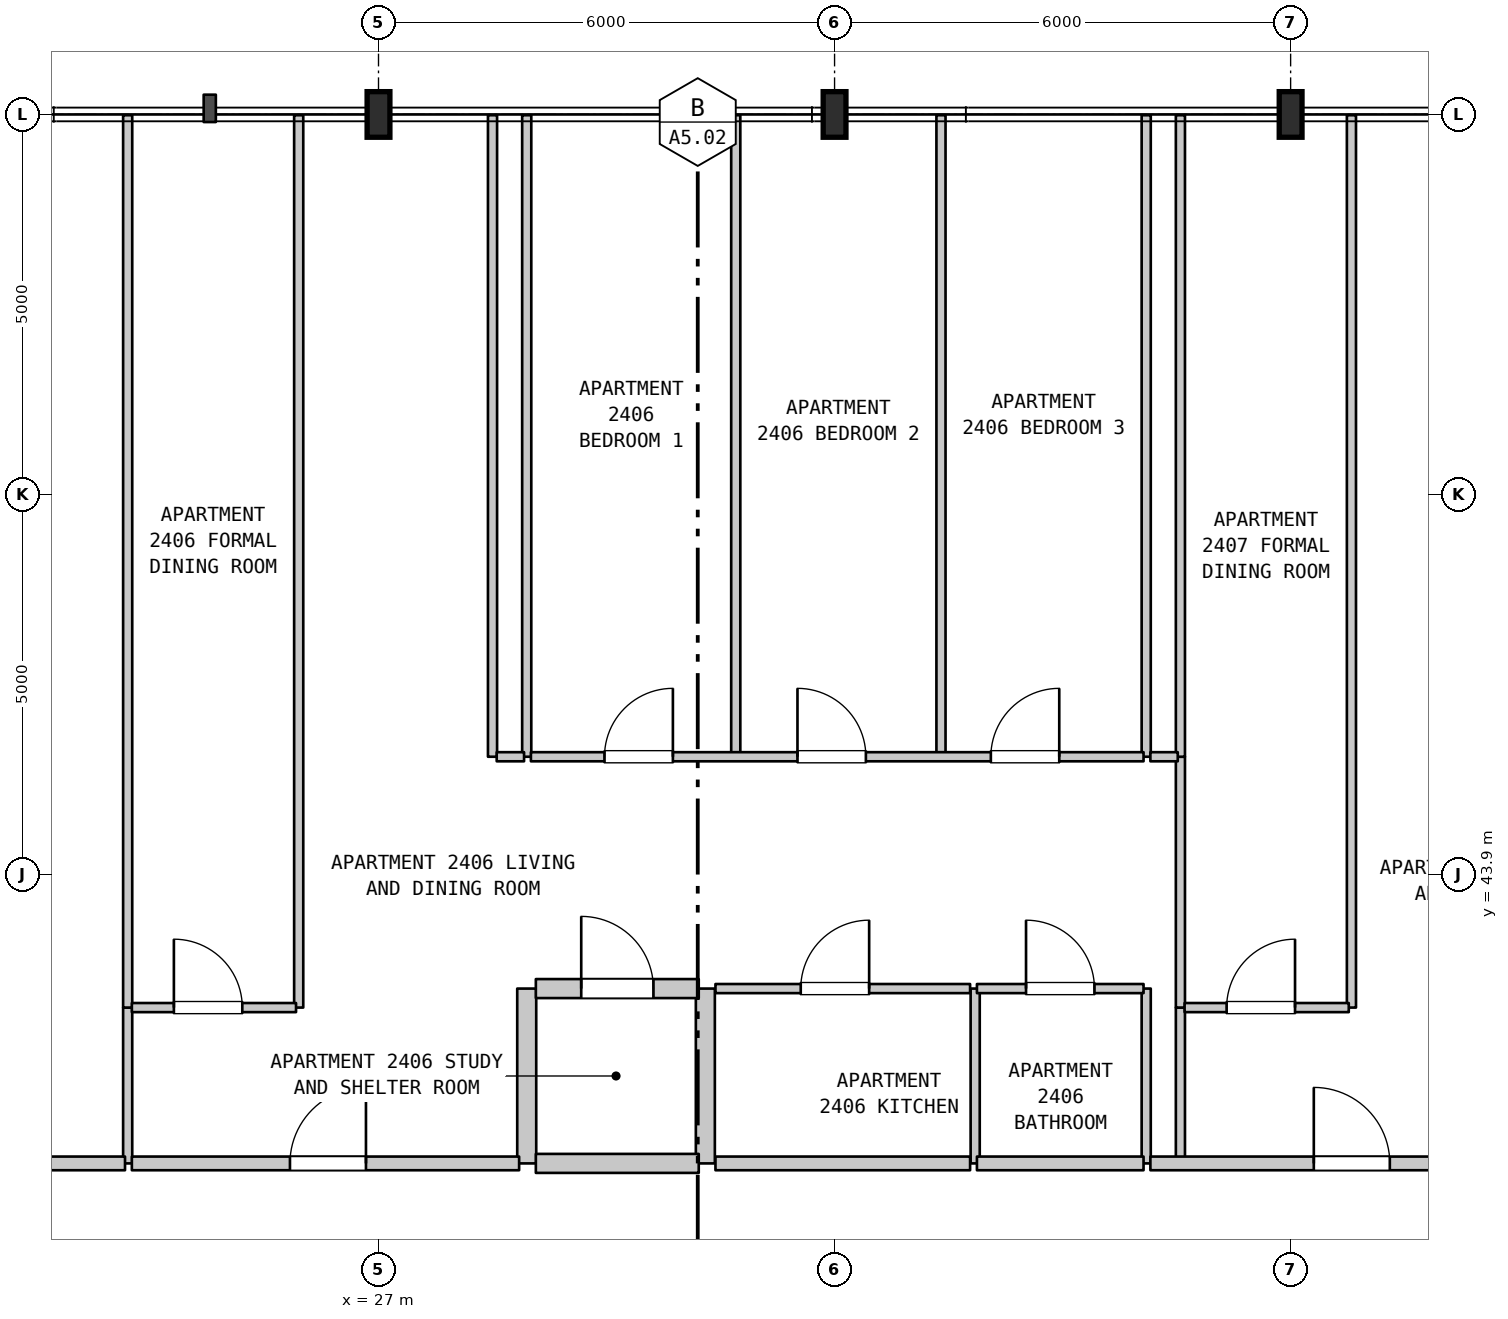
"""IFC4 building model, lengths in metres.
Left out: names, types, materials, properties, quantities, classifications, styles, units other than length and angle.
Written with IfcOpenShell. Run it as: python <this file> out.ifc"""

import sys

from ifc_helpers import new_model, si_unit, direction, frame, frame_2d, origin, origin_2d, place, context, subcontext, project, spatial, rectangle, i_section, extrude, element, fill, save


model = new_model("IFC4")
c1 = context("Model", 3, precision=1e-05, world=origin(), true_north=direction((0.0, 1.0)))
c2 = subcontext(c1, "Body", "Model", "MODEL_VIEW")
j1 = project(units=[si_unit("LENGTHUNIT", "METRE"), si_unit("PLANEANGLEUNIT", "RADIAN")], contexts=[c1])
p1 = place(None, origin())
s1 = spatial("IfcSite", under=j1, at=p1, CompositionType="ELEMENT")
p2 = place(p1, origin())
s2 = spatial("IfcBuilding", under=s1, at=p2, CompositionType="ELEMENT")
p3 = place(p2, frame((0.0, 0.0, 102.0)))
s3 = spatial("IfcBuildingStorey", under=s2, at=p3, CompositionType="ELEMENT", Elevation=102.0)
for number, where, z_axis, x_axis in (
    (1, (27.0, 53.9, 0.0), (0.0, 0.0, 1.0), (1.0, 0.0, 0.0)),
    (2, (33.0, 53.9, 0.0), (0.0, 0.0, 1.0), (1.0, 0.0, 0.0)),
    (3, (39.0, 53.9, 0.0), (0.0, 0.0, 1.0), (1.0, 0.0, 0.0)),
):
    element("IfcColumn", number, at=place(p3, frame(where, z_axis=z_axis, x_axis=x_axis)), inside=s3, PredefinedType="COLUMN", context=c2, shape_type="SweptSolid", body=[
        extrude(i_section(OverallWidth=0.3, OverallDepth=0.6, WebThickness=0.015, FlangeThickness=0.03, FilletRadius=0.027, at=origin_2d()), origin(), (0.0, 0.0, 1.0), 3.7),
    ])
p4 = place(p3, frame((23.7, 40.1, 0.0), z_axis=(0.0, 0.0, 1.0), x_axis=(0.0, 1.0, 0.0)))
e4 = element("IfcWall", 4, at=p4, inside=s3, PredefinedType="PARTITIONING", context=c2, shape_type="SweptSolid", body=[
    extrude(rectangle(XDim=2.05, YDim=0.12, at=frame_2d((1.025, 0.0))), origin(), (0.0, 0.0, 1.0), 3.385),
])
for number, where, z_axis, x_axis in (
    (5, (23.7, 42.15, 0.0), (0.0, 0.0, 1.0), (0.0, 1.0, 0.0)),
    (6, (25.95, 42.15, 0.0), (0.0, 0.0, 1.0), (0.0, 1.0, 0.0)),
):
    element("IfcWall", number, at=place(p3, frame(where, z_axis=z_axis, x_axis=x_axis)), inside=s3, PredefinedType="PARTITIONING", context=c2, shape_type="SweptSolid", body=[
        extrude(rectangle(XDim=11.74, YDim=0.12, at=frame_2d((5.87, 0.0))), origin(), (0.0, 0.0, 1.0), 3.385),
    ])
p5 = place(p3, frame((28.5, 45.45, 0.0), z_axis=(0.0, 0.0, 1.0), x_axis=(0.0, 1.0, 0.0)))
e7 = element("IfcWall", 7, at=p5, inside=s3, PredefinedType="PARTITIONING", context=c2, shape_type="SweptSolid", body=[
    extrude(rectangle(XDim=8.44, YDim=0.12, at=frame_2d((4.22, 0.0))), origin(), (0.0, 0.0, 1.0), 3.385),
])
p6 = place(p3, frame((28.95, 40.1, 0.0), z_axis=(0.0, 0.0, 1.0), x_axis=(0.0, 1.0, 0.0)))
e8 = element("IfcWall", 8, at=p6, inside=s3, PredefinedType="STANDARD", context=c2, shape_type="SweptSolid", body=[
    extrude(rectangle(XDim=2.3, YDim=0.25, at=frame_2d((1.15, 0.0))), origin(), (0.0, 0.0, 1.0), 3.385),
])
p7 = place(p3, frame((28.95, 45.45, 0.0), z_axis=(0.0, 0.0, 1.0), x_axis=(0.0, 1.0, 0.0)))
e9 = element("IfcWall", 9, at=p7, inside=s3, PredefinedType="PARTITIONING", context=c2, shape_type="SweptSolid", body=[
    extrude(rectangle(XDim=8.44, YDim=0.12, at=frame_2d((4.22, 0.0))), origin(), (0.0, 0.0, 1.0), 3.385),
])
p8 = place(p3, frame((31.3, 40.1, 0.0), z_axis=(0.0, 0.0, 1.0), x_axis=(0.0, 1.0, 0.0)))
e10 = element("IfcWall", 10, at=p8, inside=s3, PredefinedType="STANDARD", context=c2, shape_type="SweptSolid", body=[
    extrude(rectangle(XDim=2.3, YDim=0.25, at=frame_2d((1.15, 0.0))), origin(), (0.0, 0.0, 1.0), 3.385),
])
for number, where, z_axis, x_axis in (
    (11, (31.7, 45.45, 0.0), (0.0, 0.0, 1.0), (0.0, 1.0, 0.0)),
    (12, (34.4, 45.45, 0.0), (0.0, 0.0, 1.0), (0.0, 1.0, 0.0)),
):
    element("IfcWall", number, at=place(p3, frame(where, z_axis=z_axis, x_axis=x_axis)), inside=s3, PredefinedType="PARTITIONING", context=c2, shape_type="SweptSolid", body=[
        extrude(rectangle(XDim=8.44, YDim=0.12, at=frame_2d((4.22, 0.0))), origin(), (0.0, 0.0, 1.0), 3.385),
    ])
for number, where, z_axis, x_axis in (
    (13, (34.85, 40.1, 0.0), (0.0, 0.0, 1.0), (0.0, 1.0, 0.0)),
    (14, (37.1, 40.1, 0.0), (0.0, 0.0, 1.0), (0.0, 1.0, 0.0)),
):
    element("IfcWall", number, at=place(p3, frame(where, z_axis=z_axis, x_axis=x_axis)), inside=s3, PredefinedType="PARTITIONING", context=c2, shape_type="SweptSolid", body=[
        extrude(rectangle(XDim=2.3, YDim=0.12, at=frame_2d((1.15, 0.0))), origin(), (0.0, 0.0, 1.0), 3.385),
    ])
p9 = place(p3, frame((37.1, 45.45, 0.0), z_axis=(0.0, 0.0, 1.0), x_axis=(0.0, 1.0, 0.0)))
e15 = element("IfcWall", 15, at=p9, inside=s3, PredefinedType="PARTITIONING", context=c2, shape_type="SweptSolid", body=[
    extrude(rectangle(XDim=8.44, YDim=0.12, at=frame_2d((4.22, 0.0))), origin(), (0.0, 0.0, 1.0), 3.385),
])
p10 = place(p3, frame((37.55, 40.1, 0.0), z_axis=(0.0, 0.0, 1.0), x_axis=(0.0, 1.0, 0.0)))
e16 = element("IfcWall", 16, at=p10, inside=s3, PredefinedType="PARTITIONING", context=c2, shape_type="SweptSolid", body=[
    extrude(rectangle(XDim=2.05, YDim=0.12, at=frame_2d((1.025, 0.0))), origin(), (0.0, 0.0, 1.0), 3.385),
])
p11 = place(p3, frame((37.55, 42.15, 0.0), z_axis=(0.0, 0.0, 1.0), x_axis=(0.0, 1.0, 0.0)))
e17 = element("IfcWall", 17, at=p11, inside=s3, PredefinedType="PARTITIONING", context=c2, shape_type="SweptSolid", body=[
    extrude(rectangle(XDim=3.3, YDim=0.12, at=frame_2d((1.65, 0.0))), origin(), (0.0, 0.0, 1.0), 3.385),
])
p12 = place(p3, frame((37.55, 45.45, 0.0), z_axis=(0.0, 0.0, 1.0), x_axis=(0.0, 1.0, 0.0)))
e18 = element("IfcWall", 18, at=p12, inside=s3, PredefinedType="PARTITIONING", context=c2, shape_type="SweptSolid", body=[
    extrude(rectangle(XDim=8.44, YDim=0.12, at=frame_2d((4.22, 0.0))), origin(), (0.0, 0.0, 1.0), 3.385),
])
p13 = place(p3, frame((39.8, 42.15, 0.0), z_axis=(0.0, 0.0, 1.0), x_axis=(0.0, 1.0, 0.0)))
e19 = element("IfcWall", 19, at=p13, inside=s3, PredefinedType="PARTITIONING", context=c2, shape_type="SweptSolid", body=[
    extrude(rectangle(XDim=11.74, YDim=0.12, at=frame_2d((5.87, 0.0))), origin(), (0.0, 0.0, 1.0), 3.385),
])
p14 = place(p3, frame((21.255, 40.1, 0.0), z_axis=(0.0, 0.0, 1.0), x_axis=(1.0, 0.0, 0.0)))
e20 = element("IfcWall", 20, at=p14, inside=s3, PredefinedType="STANDARD", context=c2, shape_type="SweptSolid", body=[
    extrude(rectangle(XDim=2.41, YDim=0.18, at=frame_2d((1.205, 0.0))), origin(), (0.0, 0.0, 1.0), 3.385),
])
p15 = place(p3, frame((23.755, 40.1, 0.0), z_axis=(0.0, 0.0, 1.0), x_axis=(1.0, 0.0, 0.0)))
e21 = element("IfcWall", 21, at=p15, inside=s3, PredefinedType="STANDARD", context=c2, shape_type="SweptSolid", body=[
    extrude(rectangle(XDim=5.095, YDim=0.18, at=frame_2d((2.548, 0.0))), origin(), (0.0, 0.0, 1.0), 3.385),
])
p16 = place(p15, frame((2.08, 0.0, 0.0)))
e22 = element("IfcOpeningElement", 22, at=p16, cuts=e21, PredefinedType="OPENING", context=c2, shape_type="SweptSolid", body=[
    extrude(rectangle(XDim=1.0, YDim=2.15, at=frame_2d((0.5, 1.075))), frame((0.0, 0.1, 0.0), z_axis=(0.0, -1.0, 0.0), x_axis=(1.0, 0.0, 0.0)), (0.0, 0.0, 1.0), 0.2),
])
p17 = place(p3, frame((29.07, 40.1, 0.0), z_axis=(0.0, 0.0, 1.0), x_axis=(1.0, 0.0, 0.0)))
e23 = element("IfcWall", 23, at=p17, inside=s3, PredefinedType="STANDARD", context=c2, shape_type="SweptSolid", body=[
    extrude(rectangle(XDim=2.143, YDim=0.25, at=frame_2d((1.071, 0.0))), origin(), (0.0, 0.0, 1.0), 3.385),
])
p18 = place(p3, frame((31.433, 40.1, 0.0), z_axis=(0.0, 0.0, 1.0), x_axis=(1.0, 0.0, 0.0)))
e24 = element("IfcWall", 24, at=p18, inside=s3, PredefinedType="STANDARD", context=c2, shape_type="SweptSolid", body=[
    extrude(rectangle(XDim=3.35, YDim=0.18, at=frame_2d((1.675, 0.0))), origin(), (0.0, 0.0, 1.0), 3.385),
])
p19 = place(p3, frame((34.873, 40.1, 0.0), z_axis=(0.0, 0.0, 1.0), x_axis=(1.0, 0.0, 0.0)))
e25 = element("IfcWall", 25, at=p19, inside=s3, PredefinedType="STANDARD", context=c2, shape_type="SweptSolid", body=[
    extrude(rectangle(XDim=2.192, YDim=0.18, at=frame_2d((1.096, 0.0))), origin(), (0.0, 0.0, 1.0), 3.385),
])
p20 = place(p3, frame((37.155, 40.1, 0.0), z_axis=(0.0, 0.0, 1.0), x_axis=(1.0, 0.0, 0.0)))
e26 = element("IfcWall", 26, at=p20, inside=s3, PredefinedType="STANDARD", context=c2, shape_type="SweptSolid", body=[
    extrude(rectangle(XDim=5.3, YDim=0.18, at=frame_2d((2.65, 0.0))), origin(), (0.0, 0.0, 1.0), 3.385),
])
p21 = place(p20, frame((2.15, 0.0, 0.0)))
e27 = element("IfcOpeningElement", 27, at=p21, cuts=e26, PredefinedType="OPENING", context=c2, shape_type="SweptSolid", body=[
    extrude(rectangle(XDim=1.0, YDim=2.15, at=frame_2d((0.5, 1.075))), frame((0.0, 0.1, 0.0), z_axis=(0.0, -1.0, 0.0), x_axis=(1.0, 0.0, 0.0)), (0.0, 0.0, 1.0), 0.2),
])
p22 = place(p3, frame((23.755, 42.15, 0.0), z_axis=(0.0, 0.0, 1.0), x_axis=(1.0, 0.0, 0.0)))
e28 = element("IfcWall", 28, at=p22, inside=s3, PredefinedType="PARTITIONING", context=c2, shape_type="SweptSolid", body=[
    extrude(rectangle(XDim=2.16, YDim=0.12, at=frame_2d((1.08, 0.0))), origin(), (0.0, 0.0, 1.0), 3.385),
])
p23 = place(p22, frame((0.553, 0.0, 0.0)))
e29 = element("IfcOpeningElement", 29, at=p23, cuts=e28, PredefinedType="OPENING", context=c2, shape_type="SweptSolid", body=[
    extrude(rectangle(XDim=0.9, YDim=2.15, at=frame_2d((0.45, 1.075))), frame((0.0, 0.07, 0.0), z_axis=(0.0, -1.0, 0.0), x_axis=(1.0, 0.0, 0.0)), (0.0, 0.0, 1.0), 0.14),
])
p24 = place(p3, frame((37.605, 42.15, 0.0), z_axis=(0.0, 0.0, 1.0), x_axis=(1.0, 0.0, 0.0)))
e30 = element("IfcWall", 30, at=p24, inside=s3, PredefinedType="PARTITIONING", context=c2, shape_type="SweptSolid", body=[
    extrude(rectangle(XDim=2.16, YDim=0.12, at=frame_2d((1.08, 0.0))), origin(), (0.0, 0.0, 1.0), 3.385),
])
p25 = place(p24, frame((0.553, 0.0, 0.0)))
e31 = element("IfcOpeningElement", 31, at=p25, cuts=e30, PredefinedType="OPENING", context=c2, shape_type="SweptSolid", body=[
    extrude(rectangle(XDim=0.9, YDim=2.15, at=frame_2d((0.45, 1.075))), frame((0.0, 0.07, 0.0), z_axis=(0.0, -1.0, 0.0), x_axis=(1.0, 0.0, 0.0)), (0.0, 0.0, 1.0), 0.14),
])
p26 = place(p3, frame((29.07, 42.4, 0.0), z_axis=(0.0, 0.0, 1.0), x_axis=(1.0, 0.0, 0.0)))
e32 = element("IfcWall", 32, at=p26, inside=s3, PredefinedType="STANDARD", context=c2, shape_type="SweptSolid", body=[
    extrude(rectangle(XDim=2.143, YDim=0.25, at=frame_2d((1.071, 0.0))), origin(), (0.0, 0.0, 1.0), 3.385),
])
p27 = place(p26, frame((0.597, 0.0, 0.0)))
e33 = element("IfcOpeningElement", 33, at=p27, cuts=e32, PredefinedType="OPENING", context=c2, shape_type="SweptSolid", body=[
    extrude(rectangle(XDim=0.95, YDim=2.15, at=frame_2d((0.475, 1.075))), frame((0.0, 0.135, 0.0), z_axis=(0.0, -1.0, 0.0), x_axis=(1.0, 0.0, 0.0)), (0.0, 0.0, 1.0), 0.27),
])
p28 = place(p3, frame((31.433, 42.4, 0.0), z_axis=(0.0, 0.0, 1.0), x_axis=(1.0, 0.0, 0.0)))
e34 = element("IfcWall", 34, at=p28, inside=s3, PredefinedType="PARTITIONING", context=c2, shape_type="SweptSolid", body=[
    extrude(rectangle(XDim=3.35, YDim=0.12, at=frame_2d((1.675, 0.0))), origin(), (0.0, 0.0, 1.0), 3.385),
])
p29 = place(p28, frame((1.122, 0.0, 0.0)))
e35 = element("IfcOpeningElement", 35, at=p29, cuts=e34, PredefinedType="OPENING", context=c2, shape_type="SweptSolid", body=[
    extrude(rectangle(XDim=0.9, YDim=2.15, at=frame_2d((0.45, 1.075))), frame((0.0, 0.07, 0.0), z_axis=(0.0, -1.0, 0.0), x_axis=(1.0, 0.0, 0.0)), (0.0, 0.0, 1.0), 0.14),
])
p30 = place(p3, frame((34.873, 42.4, 0.0), z_axis=(0.0, 0.0, 1.0), x_axis=(1.0, 0.0, 0.0)))
e36 = element("IfcWall", 36, at=p30, inside=s3, PredefinedType="PARTITIONING", context=c2, shape_type="SweptSolid", body=[
    extrude(rectangle(XDim=2.192, YDim=0.12, at=frame_2d((1.096, 0.0))), origin(), (0.0, 0.0, 1.0), 3.385),
])
p31 = place(p30, frame((0.646, 0.0, 0.0)))
e37 = element("IfcOpeningElement", 37, at=p31, cuts=e36, PredefinedType="OPENING", context=c2, shape_type="SweptSolid", body=[
    extrude(rectangle(XDim=0.9, YDim=2.1, at=frame_2d((0.45, 1.05))), frame((0.0, 0.07, 0.0), z_axis=(0.0, -1.0, 0.0), x_axis=(1.0, 0.0, 0.0)), (0.0, 0.0, 1.0), 0.14),
])
p32 = place(p3, frame((28.555, 45.45, 0.0), z_axis=(0.0, 0.0, 1.0), x_axis=(1.0, 0.0, 0.0)))
e38 = element("IfcWall", 38, at=p32, inside=s3, PredefinedType="PARTITIONING", context=c2, shape_type="SweptSolid", body=[
    extrude(rectangle(XDim=0.36, YDim=0.12, at=frame_2d((0.18, 0.0))), origin(), (0.0, 0.0, 1.0), 3.385),
])
p33 = place(p3, frame((29.005, 45.45, 0.0), z_axis=(0.0, 0.0, 1.0), x_axis=(1.0, 0.0, 0.0)))
e39 = element("IfcWall", 39, at=p33, inside=s3, PredefinedType="PARTITIONING", context=c2, shape_type="SweptSolid", body=[
    extrude(rectangle(XDim=8.06, YDim=0.12, at=frame_2d((4.03, 0.0))), origin(), (0.0, 0.0, 1.0), 3.385),
])
p34 = place(p33, frame((0.968, 0.0, 0.0)))
e40 = element("IfcOpeningElement", 40, at=p34, cuts=e39, PredefinedType="OPENING", context=c2, shape_type="SweptSolid", body=[
    extrude(rectangle(XDim=0.9, YDim=2.15, at=frame_2d((0.45, 1.075))), frame((0.0, 0.07, 0.0), z_axis=(0.0, -1.0, 0.0), x_axis=(1.0, 0.0, 0.0)), (0.0, 0.0, 1.0), 0.14),
])
p35 = place(p33, frame((3.507, 0.0, 0.0)))
e41 = element("IfcOpeningElement", 41, at=p35, cuts=e39, PredefinedType="OPENING", context=c2, shape_type="SweptSolid", body=[
    extrude(rectangle(XDim=0.9, YDim=2.15, at=frame_2d((0.45, 1.075))), frame((0.0, 0.07, 0.0), z_axis=(0.0, -1.0, 0.0), x_axis=(1.0, 0.0, 0.0)), (0.0, 0.0, 1.0), 0.14),
])
p36 = place(p33, frame((6.051, 0.0, 0.0)))
e42 = element("IfcOpeningElement", 42, at=p36, cuts=e39, PredefinedType="OPENING", context=c2, shape_type="SweptSolid", body=[
    extrude(rectangle(XDim=0.9, YDim=2.15, at=frame_2d((0.45, 1.075))), frame((0.0, 0.07, 0.0), z_axis=(0.0, -1.0, 0.0), x_axis=(1.0, 0.0, 0.0)), (0.0, 0.0, 1.0), 0.14),
])
p37 = place(p3, frame((37.155, 45.45, 0.0), z_axis=(0.0, 0.0, 1.0), x_axis=(1.0, 0.0, 0.0)))
e43 = element("IfcWall", 43, at=p37, inside=s3, PredefinedType="PARTITIONING", context=c2, shape_type="SweptSolid", body=[
    extrude(rectangle(XDim=0.36, YDim=0.12, at=frame_2d((0.18, 0.0))), origin(), (0.0, 0.0, 1.0), 3.385),
])
p38 = place(p16, origin())
e44 = element("IfcDoor", 44, at=p38, inside=s3, OperationType="SINGLE_SWING_RIGHT", PredefinedType="DOOR", context=c2, shape_type="SweptSolid", body=[
    extrude(rectangle(XDim=1.0, YDim=2.15, at=frame_2d((0.5, 1.075))), frame((0.0, 0.025, 0.0), z_axis=(0.0, -1.0, 0.0), x_axis=(1.0, 0.0, 0.0)), (0.0, 0.0, 1.0), 0.05),
])
fill(e22, e44)
p39 = place(p21, origin())
e45 = element("IfcDoor", 45, at=p39, inside=s3, OperationType="SINGLE_SWING_LEFT", PredefinedType="DOOR", context=c2, shape_type="SweptSolid", body=[
    extrude(rectangle(XDim=1.0, YDim=2.15, at=frame_2d((0.5, 1.075))), frame((0.0, 0.025, 0.0), z_axis=(0.0, -1.0, 0.0), x_axis=(1.0, 0.0, 0.0)), (0.0, 0.0, 1.0), 0.05),
])
fill(e27, e45)
p40 = place(p23, origin())
e46 = element("IfcDoor", 46, at=p40, inside=s3, OperationType="SINGLE_SWING_LEFT", PredefinedType="DOOR", context=c2, shape_type="SweptSolid", body=[
    extrude(rectangle(XDim=0.9, YDim=2.15, at=frame_2d((0.45, 1.075))), frame((0.0, 0.025, 0.0), z_axis=(0.0, -1.0, 0.0), x_axis=(1.0, 0.0, 0.0)), (0.0, 0.0, 1.0), 0.05),
])
fill(e29, e46)
p41 = place(p25, origin())
e47 = element("IfcDoor", 47, at=p41, inside=s3, OperationType="SINGLE_SWING_RIGHT", PredefinedType="DOOR", context=c2, shape_type="SweptSolid", body=[
    extrude(rectangle(XDim=0.9, YDim=2.15, at=frame_2d((0.45, 1.075))), frame((0.0, 0.025, 0.0), z_axis=(0.0, -1.0, 0.0), x_axis=(1.0, 0.0, 0.0)), (0.0, 0.0, 1.0), 0.05),
])
fill(e31, e47)
p42 = place(p27, origin())
e48 = element("IfcDoor", 48, at=p42, inside=s3, OperationType="SINGLE_SWING_LEFT", PredefinedType="DOOR", context=c2, shape_type="SweptSolid", body=[
    extrude(rectangle(XDim=0.95, YDim=2.15, at=frame_2d((0.475, 1.075))), frame((0.0, 0.025, 0.0), z_axis=(0.0, -1.0, 0.0), x_axis=(1.0, 0.0, 0.0)), (0.0, 0.0, 1.0), 0.05),
])
fill(e33, e48)
p43 = place(p29, origin())
e49 = element("IfcDoor", 49, at=p43, inside=s3, OperationType="SINGLE_SWING_RIGHT", PredefinedType="DOOR", context=c2, shape_type="SweptSolid", body=[
    extrude(rectangle(XDim=0.9, YDim=2.15, at=frame_2d((0.45, 1.075))), frame((0.0, 0.025, 0.0), z_axis=(0.0, -1.0, 0.0), x_axis=(1.0, 0.0, 0.0)), (0.0, 0.0, 1.0), 0.05),
])
fill(e35, e49)
p44 = place(p31, origin())
e50 = element("IfcDoor", 50, at=p44, inside=s3, OperationType="SINGLE_SWING_LEFT", PredefinedType="DOOR", context=c2, shape_type="SweptSolid", body=[
    extrude(rectangle(XDim=0.9, YDim=2.1, at=frame_2d((0.45, 1.05))), frame((0.0, 0.025, 0.0), z_axis=(0.0, -1.0, 0.0), x_axis=(1.0, 0.0, 0.0)), (0.0, 0.0, 1.0), 0.05),
])
fill(e37, e50)
p45 = place(p34, origin())
e51 = element("IfcDoor", 51, at=p45, inside=s3, OperationType="SINGLE_SWING_RIGHT", PredefinedType="DOOR", context=c2, shape_type="SweptSolid", body=[
    extrude(rectangle(XDim=0.9, YDim=2.15, at=frame_2d((0.45, 1.075))), frame((0.0, 0.025, 0.0), z_axis=(0.0, -1.0, 0.0), x_axis=(1.0, 0.0, 0.0)), (0.0, 0.0, 1.0), 0.05),
])
fill(e40, e51)
p46 = place(p35, origin())
e52 = element("IfcDoor", 52, at=p46, inside=s3, OperationType="SINGLE_SWING_LEFT", PredefinedType="DOOR", context=c2, shape_type="SweptSolid", body=[
    extrude(rectangle(XDim=0.9, YDim=2.15, at=frame_2d((0.45, 1.075))), frame((0.0, 0.025, 0.0), z_axis=(0.0, -1.0, 0.0), x_axis=(1.0, 0.0, 0.0)), (0.0, 0.0, 1.0), 0.05),
])
fill(e41, e52)
p47 = place(p36, origin())
e53 = element("IfcDoor", 53, at=p47, inside=s3, OperationType="SINGLE_SWING_RIGHT", PredefinedType="DOOR", context=c2, shape_type="SweptSolid", body=[
    extrude(rectangle(XDim=0.9, YDim=2.15, at=frame_2d((0.45, 1.075))), frame((0.0, 0.025, 0.0), z_axis=(0.0, -1.0, 0.0), x_axis=(1.0, 0.0, 0.0)), (0.0, 0.0, 1.0), 0.05),
])
fill(e42, e53)
save(model, sys.argv[1])
